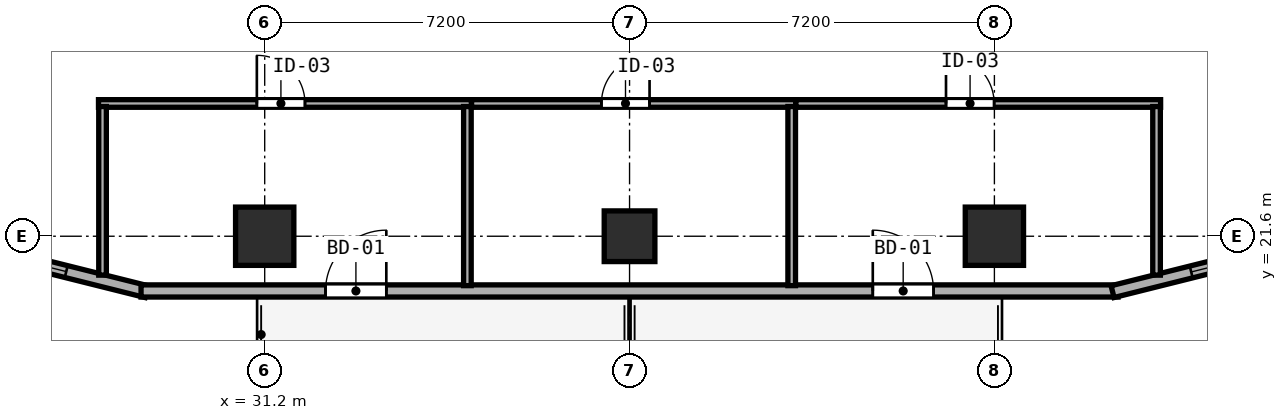
"""IFC4 building model, lengths in metres.
Left out: names, types, materials, properties, quantities, classifications, styles, units other than length and angle.
Written with IfcOpenShell. Run it as: python <this file> out.ifc"""

import sys

from ifc_helpers import new_model, si_unit, direction, frame, frame_2d, origin, origin_2d, place, context, subcontext, project, spatial, rectangle, hollow_rectangle, extrude, element, fill, save


model = new_model("IFC4")
c1 = context("Model", 3, precision=1e-05, world=origin(), true_north=direction((0.0, 1.0)))
c2 = subcontext(c1, "Body", "Model", "MODEL_VIEW")
j1 = project(units=[si_unit("LENGTHUNIT", "METRE"), si_unit("PLANEANGLEUNIT", "RADIAN")], contexts=[c1])
p1 = place(None, origin())
s1 = spatial("IfcSite", under=j1, at=p1, CompositionType="ELEMENT")
p2 = place(p1, origin())
s2 = spatial("IfcBuilding", under=s1, at=p2, CompositionType="ELEMENT")
p3 = place(p2, frame((0.0, 0.0, 85.6)))
s3 = spatial("IfcBuildingStorey", under=s2, at=p3, CompositionType="ELEMENT", Elevation=85.6)
for number, where, z_axis, x_axis in (
    (1, (31.2, 21.6, 0.0), (0.0, 0.0, 1.0), (1.0, 0.0, 0.0)),
    (2, (45.6, 21.6, 0.0), (0.0, 0.0, 1.0), (1.0, 0.0, 0.0)),
):
    element("IfcColumn", number, at=place(p3, frame(where, z_axis=z_axis, x_axis=x_axis)), inside=s3, PredefinedType="COLUMN", context=c2, shape_type="SweptSolid", body=[
        extrude(hollow_rectangle(XDim=1.15, YDim=1.15, WallThickness=0.042, at=origin_2d()), origin(), (0.0, 0.0, 1.0), 3.8),
    ])
p4 = place(p3, frame((38.4, 21.6, 0.0), z_axis=(0.0, 0.0, 1.0), x_axis=(1.0, 0.0, 0.0)))
e3 = element("IfcColumn", 3, at=p4, inside=s3, PredefinedType="COLUMN", context=c2, shape_type="SweptSolid", body=[
    extrude(hollow_rectangle(XDim=1.0, YDim=1.0, WallThickness=0.038, at=origin_2d()), origin(), (0.0, 0.0, 1.0), 3.8),
])
p5 = place(p3, frame((24.567, 21.582, 0.0), z_axis=(0.0, 0.0, 1.0), x_axis=(0.970148978127, -0.24250971164, 0.0)))
e4 = element("IfcWall", 4, at=p5, inside=s3, PredefinedType="SOLIDWALL", context=c2, shape_type="SweptSolid", body=[
    extrude(rectangle(XDim=4.434, YDim=0.24, at=frame_2d((2.217, 0.0))), origin(), (0.0, 0.0, 1.0), 3.037),
])
p6 = place(p5, frame((1.6, 0.0, 0.85)))
e5 = element("IfcOpeningElement", 5, at=p6, cuts=e4, PredefinedType="OPENING", context=c2, shape_type="SweptSolid", body=[
    extrude(rectangle(XDim=1.2, YDim=1.85, at=frame_2d((0.6, 0.925))), frame((0.0, 0.13, 0.0), z_axis=(0.0, -1.0, 0.0), x_axis=(1.0, 0.0, 0.0)), (0.0, 0.0, 1.0), 0.26),
])
p7 = place(p3, frame((28.76, 20.52, 0.0), z_axis=(0.0, 0.0, 1.0), x_axis=(1.0, 0.0, 0.0)))
e6 = element("IfcWall", 6, at=p7, inside=s3, PredefinedType="SOLIDWALL", context=c2, shape_type="SweptSolid", body=[
    extrude(rectangle(XDim=19.281, YDim=0.24, at=frame_2d((9.64, 0.0))), origin(), (0.0, 0.0, 1.0), 3.54),
])
p8 = place(p7, frame((4.84, 0.0, 0.0), z_axis=(0.0, 0.0, 1.0), x_axis=(-1.0, 0.0, 0.0)))
e7 = element("IfcOpeningElement", 7, at=p8, cuts=e6, PredefinedType="OPENING", context=c2, shape_type="SweptSolid", body=[
    extrude(rectangle(XDim=1.2, YDim=2.15, at=frame_2d((0.6, 1.075))), frame((0.0, 0.13, 0.0), z_axis=(0.0, -1.0, 0.0), x_axis=(1.0, 0.0, 0.0)), (0.0, 0.0, 1.0), 0.26),
])
p9 = place(p7, frame((15.64, 0.0, 0.0), z_axis=(0.0, 0.0, 1.0), x_axis=(-1.0, 0.0, 0.0)))
e8 = element("IfcOpeningElement", 8, at=p9, cuts=e6, PredefinedType="OPENING", context=c2, shape_type="SweptSolid", body=[
    extrude(rectangle(XDim=1.2, YDim=2.15, at=frame_2d((0.6, 1.075))), frame((0.0, 0.13, 0.0), z_axis=(0.0, -1.0, 0.0), x_axis=(1.0, 0.0, 0.0)), (0.0, 0.0, 1.0), 0.26),
])
p10 = place(p3, frame((47.932, 20.507, 0.0), z_axis=(0.0, 0.0, 1.0), x_axis=(0.970145739396, 0.242522667667, 0.0)))
e9 = element("IfcWall", 9, at=p10, inside=s3, PredefinedType="SOLIDWALL", context=c2, shape_type="SweptSolid", body=[
    extrude(rectangle(XDim=4.433, YDim=0.24, at=frame_2d((2.217, 0.0))), origin(), (0.0, 0.0, 1.0), 3.037),
])
p11 = place(p10, frame((1.6, 0.0, 0.85)))
e10 = element("IfcOpeningElement", 10, at=p11, cuts=e9, PredefinedType="OPENING", context=c2, shape_type="SweptSolid", body=[
    extrude(rectangle(XDim=1.2, YDim=1.85, at=frame_2d((0.6, 0.925))), frame((0.0, 0.13, 0.0), z_axis=(0.0, -1.0, 0.0), x_axis=(1.0, 0.0, 0.0)), (0.0, 0.0, 1.0), 0.26),
])
p12 = place(p3, frame((27.92, 24.22, 0.0), z_axis=(0.0, 0.0, 1.0), x_axis=(1.0, 0.0, 0.0)))
e11 = element("IfcWall", 11, at=p12, inside=s3, PredefinedType="PARTITIONING", context=c2, shape_type="SweptSolid", body=[
    extrude(rectangle(XDim=7.36, YDim=0.15, at=frame_2d((3.68, 0.0))), origin(), (0.0, 0.0, 1.0), 3.54),
])
p13 = place(p12, frame((4.075, 0.0, 0.0), z_axis=(0.0, 0.0, 1.0), x_axis=(-1.0, 0.0, 0.0)))
e12 = element("IfcOpeningElement", 12, at=p13, cuts=e11, PredefinedType="OPENING", context=c2, shape_type="SweptSolid", body=[
    extrude(rectangle(XDim=0.95, YDim=2.12, at=frame_2d((0.475, 1.06))), frame((0.0, 0.085, 0.0), z_axis=(0.0, -1.0, 0.0), x_axis=(1.0, 0.0, 0.0)), (0.0, 0.0, 1.0), 0.17),
])
p14 = place(p3, frame((28.0, 20.832, 0.0), z_axis=(0.0, 0.0, 1.0), x_axis=(0.0, 1.0, 0.0)))
e13 = element("IfcWall", 13, at=p14, inside=s3, PredefinedType="PARTITIONING", context=c2, shape_type="SweptSolid", body=[
    extrude(rectangle(XDim=3.328, YDim=0.15, at=frame_2d((1.664, 0.0))), origin(), (0.0, 0.0, 1.0), 3.54),
])
p15 = place(p3, frame((35.2, 20.625, 0.0), z_axis=(0.0, 0.0, 1.0), x_axis=(0.0, 1.0, 0.0)))
e14 = element("IfcWall", 14, at=p15, inside=s3, PredefinedType="PARTITIONING", context=c2, shape_type="SweptSolid", body=[
    extrude(rectangle(XDim=3.535, YDim=0.15, at=frame_2d((1.768, 0.0))), origin(), (0.0, 0.0, 1.0), 3.54),
])
p16 = place(p3, frame((35.282, 24.22, 0.0), z_axis=(0.0, 0.0, 1.0), x_axis=(1.0, 0.0, 0.0)))
e15 = element("IfcWall", 15, at=p16, inside=s3, PredefinedType="PARTITIONING", context=c2, shape_type="SweptSolid", body=[
    extrude(rectangle(XDim=6.398, YDim=0.15, at=frame_2d((3.199, 0.0))), origin(), (0.0, 0.0, 1.0), 3.54),
])
p17 = place(p16, frame((3.513, 0.0, 0.0), z_axis=(0.0, 0.0, 1.0), x_axis=(-1.0, 0.0, 0.0)))
e16 = element("IfcOpeningElement", 16, at=p17, cuts=e15, PredefinedType="OPENING", context=c2, shape_type="SweptSolid", body=[
    extrude(rectangle(XDim=0.95, YDim=2.12, at=frame_2d((0.475, 1.06))), frame((0.0, 0.085, 0.0), z_axis=(0.0, -1.0, 0.0), x_axis=(1.0, 0.0, 0.0)), (0.0, 0.0, 1.0), 0.17),
])
p18 = place(p3, frame((41.6, 20.625, 0.0), z_axis=(0.0, 0.0, 1.0), x_axis=(0.0, 1.0, 0.0)))
e17 = element("IfcWall", 17, at=p18, inside=s3, PredefinedType="PARTITIONING", context=c2, shape_type="SweptSolid", body=[
    extrude(rectangle(XDim=3.535, YDim=0.15, at=frame_2d((1.768, 0.0))), origin(), (0.0, 0.0, 1.0), 3.54),
])
p19 = place(p3, frame((41.682, 24.22, 0.0), z_axis=(0.0, 0.0, 1.0), x_axis=(1.0, 0.0, 0.0)))
e18 = element("IfcWall", 18, at=p19, inside=s3, PredefinedType="PARTITIONING", context=c2, shape_type="SweptSolid", body=[
    extrude(rectangle(XDim=7.198, YDim=0.15, at=frame_2d((3.599, 0.0))), origin(), (0.0, 0.0, 1.0), 3.54),
])
p20 = place(p19, frame((3.913, 0.0, 0.0), z_axis=(0.0, 0.0, 1.0), x_axis=(-1.0, 0.0, 0.0)))
e19 = element("IfcOpeningElement", 19, at=p20, cuts=e18, PredefinedType="OPENING", context=c2, shape_type="SweptSolid", body=[
    extrude(rectangle(XDim=0.95, YDim=2.12, at=frame_2d((0.475, 1.06))), frame((0.0, 0.085, 0.0), z_axis=(0.0, -1.0, 0.0), x_axis=(1.0, 0.0, 0.0)), (0.0, 0.0, 1.0), 0.17),
])
p21 = place(p3, frame((48.8, 20.832, 0.0), z_axis=(0.0, 0.0, 1.0), x_axis=(0.0, 1.0, 0.0)))
e20 = element("IfcWall", 20, at=p21, inside=s3, PredefinedType="PARTITIONING", context=c2, shape_type="SweptSolid", body=[
    extrude(rectangle(XDim=3.328, YDim=0.15, at=frame_2d((1.664, 0.0))), origin(), (0.0, 0.0, 1.0), 3.54),
])
p22 = place(p6, origin())
e21 = element("IfcWindow", 21, at=p22, inside=s3, PartitioningType="SINGLE_PANEL", PredefinedType="WINDOW", context=c2, shape_type="SweptSolid", body=[
    extrude(rectangle(XDim=1.2, YDim=1.85, at=frame_2d((0.6, 0.925))), frame((0.0, 0.03, 0.0), z_axis=(0.0, -1.0, 0.0), x_axis=(1.0, 0.0, 0.0)), (0.0, 0.0, 1.0), 0.06),
])
fill(e5, e21)
p23 = place(p11, origin())
e22 = element("IfcWindow", 22, at=p23, inside=s3, PartitioningType="SINGLE_PANEL", PredefinedType="WINDOW", context=c2, shape_type="SweptSolid", body=[
    extrude(rectangle(XDim=1.2, YDim=1.85, at=frame_2d((0.6, 0.925))), frame((0.0, 0.03, 0.0), z_axis=(0.0, -1.0, 0.0), x_axis=(1.0, 0.0, 0.0)), (0.0, 0.0, 1.0), 0.06),
])
fill(e10, e22)
p24 = place(p8, origin())
e23 = element("IfcDoor", 23, at=p24, inside=s3, OperationType="SINGLE_SWING_LEFT", PredefinedType="DOOR", context=c2, shape_type="SweptSolid", body=[
    extrude(rectangle(XDim=1.2, YDim=2.15, at=frame_2d((0.6, 1.075))), frame((0.0, 0.025, 0.0), z_axis=(0.0, -1.0, 0.0), x_axis=(1.0, 0.0, 0.0)), (0.0, 0.0, 1.0), 0.05),
])
fill(e7, e23)
p25 = place(p9, origin())
e24 = element("IfcDoor", 24, at=p25, inside=s3, OperationType="SINGLE_SWING_RIGHT", PredefinedType="DOOR", context=c2, shape_type="SweptSolid", body=[
    extrude(rectangle(XDim=1.2, YDim=2.15, at=frame_2d((0.6, 1.075))), frame((0.0, 0.025, 0.0), z_axis=(0.0, -1.0, 0.0), x_axis=(1.0, 0.0, 0.0)), (0.0, 0.0, 1.0), 0.05),
])
fill(e8, e24)
p26 = place(p13, origin())
e25 = element("IfcDoor", 25, at=p26, inside=s3, OperationType="SINGLE_SWING_RIGHT", PredefinedType="DOOR", context=c2, shape_type="SweptSolid", body=[
    extrude(rectangle(XDim=0.95, YDim=2.12, at=frame_2d((0.475, 1.06))), frame((0.0, 0.025, 0.0), z_axis=(0.0, -1.0, 0.0), x_axis=(1.0, 0.0, 0.0)), (0.0, 0.0, 1.0), 0.05),
])
fill(e12, e25)
p27 = place(p17, origin())
e26 = element("IfcDoor", 26, at=p27, inside=s3, OperationType="SINGLE_SWING_LEFT", PredefinedType="DOOR", context=c2, shape_type="SweptSolid", body=[
    extrude(rectangle(XDim=0.95, YDim=2.12, at=frame_2d((0.475, 1.06))), frame((0.0, 0.025, 0.0), z_axis=(0.0, -1.0, 0.0), x_axis=(1.0, 0.0, 0.0)), (0.0, 0.0, 1.0), 0.05),
])
fill(e16, e26)
p28 = place(p20, origin())
e27 = element("IfcDoor", 27, at=p28, inside=s3, OperationType="SINGLE_SWING_RIGHT", PredefinedType="DOOR", context=c2, shape_type="SweptSolid", body=[
    extrude(rectangle(XDim=0.95, YDim=2.12, at=frame_2d((0.475, 1.06))), frame((0.0, 0.025, 0.0), z_axis=(0.0, -1.0, 0.0), x_axis=(1.0, 0.0, 0.0)), (0.0, 0.0, 1.0), 0.05),
])
fill(e19, e27)
save(model, sys.argv[1])
